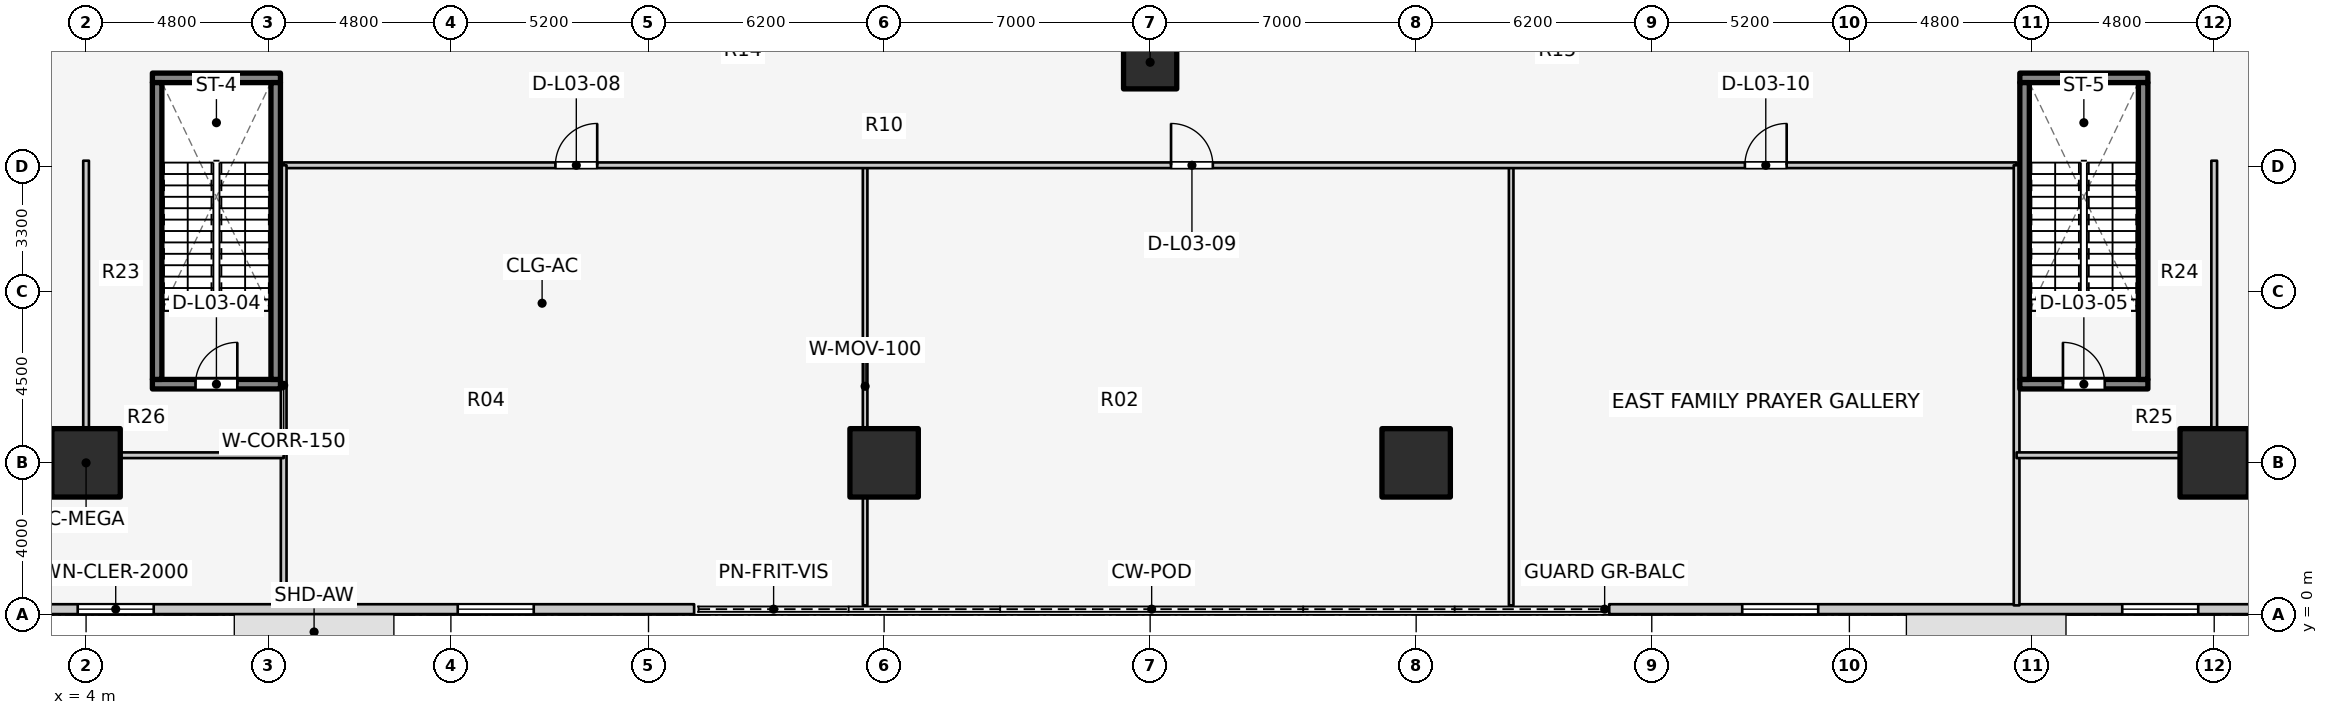
"""IFC4 building model, lengths in metres.
Left out: names, types, materials, properties, quantities, classifications, styles, units other than length and angle.
Written with IfcOpenShell. Run it as: python <this file> out.ifc"""

import sys

from ifc_helpers import new_model, si_unit, direction, frame, frame_2d, origin, origin_2d, place, context, subcontext, project, spatial, rectangle, extrude, element, fill, save


model = new_model("IFC4")
c1 = context("Model", 3, precision=1e-05, world=origin(), true_north=direction((0.0, 1.0)))
c2 = subcontext(c1, "Body", "Model", "MODEL_VIEW")
j1 = project(units=[si_unit("LENGTHUNIT", "METRE"), si_unit("PLANEANGLEUNIT", "RADIAN")], contexts=[c1])
p1 = place(None, origin())
s1 = spatial("IfcSite", under=j1, at=p1, CompositionType="ELEMENT")
p2 = place(p1, origin())
s2 = spatial("IfcBuilding", under=s1, at=p2, CompositionType="ELEMENT")
p3 = place(p2, frame((0.0, 0.0, 9.2)))
s3 = spatial("IfcBuildingStorey", under=s2, at=p3, CompositionType="ELEMENT", Elevation=9.2)
p4 = place(p3, frame((5.745, 6.07, 0.0), z_axis=(0.0, 0.0, 1.0), x_axis=(1.0, 0.0, 0.0)))
e1 = element("IfcWall", 1, at=p4, inside=s3, PredefinedType="SOLIDWALL", context=c2, shape_type="SweptSolid", body=[
    extrude(rectangle(XDim=3.37, YDim=0.25, at=frame_2d((1.685, 0.0))), origin(), (0.0, 0.0, 1.0), 4.6),
])
p5 = place(p4, frame((1.135, 0.0, 0.0)))
e2 = element("IfcOpeningElement", 2, at=p5, cuts=e1, PredefinedType="OPENING", context=c2, shape_type="SweptSolid", body=[
    extrude(rectangle(XDim=1.1, YDim=2.1, at=frame_2d((0.55, 1.05))), frame((0.0, 0.135, 0.0), z_axis=(0.0, -1.0, 0.0), x_axis=(1.0, 0.0, 0.0)), (0.0, 0.0, 1.0), 0.27),
])
p6 = place(p3, frame((5.745, 14.13, 0.0), z_axis=(0.0, 0.0, 1.0), x_axis=(1.0, 0.0, 0.0)))
e3 = element("IfcWall", 3, at=p6, inside=s3, PredefinedType="SOLIDWALL", context=c2, shape_type="SweptSolid", body=[
    extrude(rectangle(XDim=3.37, YDim=0.25, at=frame_2d((1.685, 0.0))), origin(), (0.0, 0.0, 1.0), 4.6),
])
for number, where, z_axis, x_axis in (
    (4, (5.87, 6.195, 0.0), (0.0, 0.0, 1.0), (0.0, 1.0, 0.0)),
    (5, (8.99, 6.195, 0.0), (0.0, 0.0, 1.0), (0.0, 1.0, 0.0)),
):
    element("IfcWall", number, at=place(p3, frame(where, z_axis=z_axis, x_axis=x_axis)), inside=s3, PredefinedType="SOLIDWALL", context=c2, shape_type="SweptSolid", body=[
        extrude(rectangle(XDim=7.81, YDim=0.25, at=frame_2d((3.905, 0.0))), origin(), (0.0, 0.0, 1.0), 4.6),
    ])
p7 = place(p3, frame((54.885, 6.07, 0.0), z_axis=(0.0, 0.0, 1.0), x_axis=(1.0, 0.0, 0.0)))
e6 = element("IfcWall", 6, at=p7, inside=s3, PredefinedType="SOLIDWALL", context=c2, shape_type="SweptSolid", body=[
    extrude(rectangle(XDim=3.37, YDim=0.25, at=frame_2d((1.685, 0.0))), origin(), (0.0, 0.0, 1.0), 4.6),
])
p8 = place(p7, frame((1.135, 0.0, 0.0)))
e7 = element("IfcOpeningElement", 7, at=p8, cuts=e6, PredefinedType="OPENING", context=c2, shape_type="SweptSolid", body=[
    extrude(rectangle(XDim=1.1, YDim=2.1, at=frame_2d((0.55, 1.05))), frame((0.0, 0.135, 0.0), z_axis=(0.0, -1.0, 0.0), x_axis=(1.0, 0.0, 0.0)), (0.0, 0.0, 1.0), 0.27),
])
p9 = place(p3, frame((54.885, 14.13, 0.0), z_axis=(0.0, 0.0, 1.0), x_axis=(1.0, 0.0, 0.0)))
e8 = element("IfcWall", 8, at=p9, inside=s3, PredefinedType="SOLIDWALL", context=c2, shape_type="SweptSolid", body=[
    extrude(rectangle(XDim=3.37, YDim=0.25, at=frame_2d((1.685, 0.0))), origin(), (0.0, 0.0, 1.0), 4.6),
])
for number, where, z_axis, x_axis in (
    (9, (55.01, 6.195, 0.0), (0.0, 0.0, 1.0), (0.0, 1.0, 0.0)),
    (10, (58.13, 6.195, 0.0), (0.0, 0.0, 1.0), (0.0, 1.0, 0.0)),
):
    element("IfcWall", number, at=place(p3, frame(where, z_axis=z_axis, x_axis=x_axis)), inside=s3, PredefinedType="SOLIDWALL", context=c2, shape_type="SweptSolid", body=[
        extrude(rectangle(XDim=7.81, YDim=0.25, at=frame_2d((3.905, 0.0))), origin(), (0.0, 0.0, 1.0), 4.6),
    ])
for number, where, z_axis, x_axis in (
    (11, (4.0, 4.0, 0.0), (0.0, 0.0, 1.0), (1.0, 0.0, 0.0)),
    (12, (25.0, 4.0, 0.0), (0.0, 0.0, 1.0), (1.0, 0.0, 0.0)),
    (13, (39.0, 4.0, 0.0), (0.0, 0.0, 1.0), (1.0, 0.0, 0.0)),
    (14, (60.0, 4.0, 0.0), (0.0, 0.0, 1.0), (1.0, 0.0, 0.0)),
):
    element("IfcColumn", number, at=place(p3, frame(where, z_axis=z_axis, x_axis=x_axis)), inside=s3, PredefinedType="COLUMN", context=c2, shape_type="SweptSolid", body=[
        extrude(rectangle(XDim=1.8, YDim=1.8, at=origin_2d()), origin(), (0.0, 0.0, 1.0), 4.6),
    ])
p10 = place(p3, frame((32.0, 14.54, 0.0), z_axis=(0.0, 0.0, 1.0), x_axis=(1.0, 0.0, 0.0)))
e15 = element("IfcColumn", 15, at=p10, inside=s3, PredefinedType="COLUMN", context=c2, shape_type="SweptSolid", body=[
    extrude(rectangle(XDim=1.4, YDim=1.4, at=origin_2d()), origin(), (0.0, 0.0, 1.0), 4.6),
])
p11 = place(p3, frame((0.28, 0.15, 0.0), z_axis=(0.0, 0.0, 1.0), x_axis=(1.0, 0.0, 0.0)))
e16 = element("IfcWall", 16, at=p11, inside=s3, PredefinedType="STANDARD", context=c2, shape_type="SweptSolid", body=[
    extrude(rectangle(XDim=19.72, YDim=0.26, at=frame_2d((9.86, 0.0))), origin(), (0.0, 0.0, 1.0), 4.28),
])
p12 = place(p11, frame((3.5, 0.0, 2.2)))
e17 = element("IfcOpeningElement", 17, at=p12, cuts=e16, PredefinedType="OPENING", context=c2, shape_type="SweptSolid", body=[
    extrude(rectangle(XDim=2.0, YDim=1.1, at=frame_2d((1.0, 0.55))), frame((0.0, 0.14, 0.0), z_axis=(0.0, -1.0, 0.0), x_axis=(1.0, 0.0, 0.0)), (0.0, 0.0, 1.0), 0.28),
])
p13 = place(p11, frame((13.5, 0.0, 2.2)))
e18 = element("IfcOpeningElement", 18, at=p13, cuts=e16, PredefinedType="OPENING", context=c2, shape_type="SweptSolid", body=[
    extrude(rectangle(XDim=2.0, YDim=1.1, at=frame_2d((1.0, 0.55))), frame((0.0, 0.14, 0.0), z_axis=(0.0, -1.0, 0.0), x_axis=(1.0, 0.0, 0.0)), (0.0, 0.0, 1.0), 0.28),
])
p14 = place(p3, frame((44.08, 0.15, 0.0), z_axis=(0.0, 0.0, 1.0), x_axis=(1.0, 0.0, 0.0)))
e19 = element("IfcWall", 19, at=p14, inside=s3, PredefinedType="STANDARD", context=c2, shape_type="SweptSolid", body=[
    extrude(rectangle(XDim=19.64, YDim=0.26, at=frame_2d((9.82, 0.0))), origin(), (0.0, 0.0, 1.0), 4.28),
])
p15 = place(p14, frame((3.5, 0.0, 2.2)))
e20 = element("IfcOpeningElement", 20, at=p15, cuts=e19, PredefinedType="OPENING", context=c2, shape_type="SweptSolid", body=[
    extrude(rectangle(XDim=2.0, YDim=1.1, at=frame_2d((1.0, 0.55))), frame((0.0, 0.14, 0.0), z_axis=(0.0, -1.0, 0.0), x_axis=(1.0, 0.0, 0.0)), (0.0, 0.0, 1.0), 0.28),
])
p16 = place(p14, frame((13.5, 0.0, 2.2)))
e21 = element("IfcOpeningElement", 21, at=p16, cuts=e19, PredefinedType="OPENING", context=c2, shape_type="SweptSolid", body=[
    extrude(rectangle(XDim=2.0, YDim=1.1, at=frame_2d((1.0, 0.55))), frame((0.0, 0.14, 0.0), z_axis=(0.0, -1.0, 0.0), x_axis=(1.0, 0.0, 0.0)), (0.0, 0.0, 1.0), 0.28),
])
for number, where, z_axis, x_axis in (
    (22, (30.157, 15.157, 0.0), (0.0, 0.0, 1.0), (0.989, -0.149, 0.0)),
    (23, (32.0, 14.88, 0.0), (0.0, 0.0, 1.0), (0.989, 0.149, 0.0)),
):
    element("IfcWall", number, at=place(p3, frame(where, z_axis=z_axis, x_axis=x_axis)), inside=s3, PredefinedType="STANDARD", context=c2, shape_type="SweptSolid", body=[
        extrude(rectangle(XDim=1.864, YDim=0.23, at=frame_2d((0.932, 0.0))), origin(), (0.0, 0.0, 1.0), 3.28),
    ])
for number, where, z_axis, x_axis in (
    (24, (24.5, 0.25, 0.0), (0.0, 0.0, 1.0), (0.0, 1.0, 0.0)),
    (25, (41.5, 0.25, 0.0), (0.0, 0.0, 1.0), (0.0, 1.0, 0.0)),
):
    element("IfcWall", number, at=place(p3, frame(where, z_axis=z_axis, x_axis=x_axis)), inside=s3, PredefinedType="MOVABLE", context=c2, shape_type="SweptSolid", body=[
        extrude(rectangle(XDim=11.53, YDim=0.12, at=frame_2d((5.765, 0.0))), origin(), (0.0, 0.0, 1.0), 3.3),
    ])
p17 = place(p3, frame((9.2, 11.83, 0.0), z_axis=(0.0, 0.0, 1.0), x_axis=(1.0, 0.0, 0.0)))
e26 = element("IfcWall", 26, at=p17, inside=s3, PredefinedType="PARTITIONING", context=c2, shape_type="SweptSolid", body=[
    extrude(rectangle(XDim=45.6, YDim=0.15, at=frame_2d((22.8, 0.0))), origin(), (0.0, 0.0, 1.0), 3.3),
])
p18 = place(p17, frame((7.15, 0.0, 0.0)))
e27 = element("IfcOpeningElement", 27, at=p18, cuts=e26, PredefinedType="OPENING", context=c2, shape_type="SweptSolid", body=[
    extrude(rectangle(XDim=1.1, YDim=2.1, at=frame_2d((0.55, 1.05))), frame((0.0, 0.085, 0.0), z_axis=(0.0, -1.0, 0.0), x_axis=(1.0, 0.0, 0.0)), (0.0, 0.0, 1.0), 0.17),
])
p19 = place(p17, frame((23.35, 0.0, 0.0)))
e28 = element("IfcOpeningElement", 28, at=p19, cuts=e26, PredefinedType="OPENING", context=c2, shape_type="SweptSolid", body=[
    extrude(rectangle(XDim=1.1, YDim=2.1, at=frame_2d((0.55, 1.05))), frame((0.0, 0.085, 0.0), z_axis=(0.0, -1.0, 0.0), x_axis=(1.0, 0.0, 0.0)), (0.0, 0.0, 1.0), 0.17),
])
p20 = place(p17, frame((38.45, 0.0, 0.0)))
e29 = element("IfcOpeningElement", 29, at=p20, cuts=e26, PredefinedType="OPENING", context=c2, shape_type="SweptSolid", body=[
    extrude(rectangle(XDim=1.1, YDim=2.1, at=frame_2d((0.55, 1.05))), frame((0.0, 0.085, 0.0), z_axis=(0.0, -1.0, 0.0), x_axis=(1.0, 0.0, 0.0)), (0.0, 0.0, 1.0), 0.17),
])
for number, where, z_axis, x_axis in (
    (30, (9.2, 0.25, 0.0), (0.0, 0.0, 1.0), (0.0, 1.0, 0.0)),
    (31, (54.8, 0.25, 0.0), (0.0, 0.0, 1.0), (0.0, 1.0, 0.0)),
):
    element("IfcWall", number, at=place(p3, frame(where, z_axis=z_axis, x_axis=x_axis)), inside=s3, PredefinedType="PARTITIONING", context=c2, shape_type="SweptSolid", body=[
        extrude(rectangle(XDim=11.58, YDim=0.15, at=frame_2d((5.79, 0.0))), origin(), (0.0, 0.0, 1.0), 3.3),
    ])
p21 = place(p3, frame((4.0, 4.2, 0.0), z_axis=(0.0, 0.0, 1.0), x_axis=(0.0, 1.0, 0.0)))
e32 = element("IfcWall", 32, at=p21, inside=s3, PredefinedType="PARTITIONING", context=c2, shape_type="SweptSolid", body=[
    extrude(rectangle(XDim=7.75, YDim=0.15, at=frame_2d((3.875, 0.0))), origin(), (0.0, 0.0, 1.0), 3.3),
])
p22 = place(p3, frame((4.0, 4.2, 0.0), z_axis=(0.0, 0.0, 1.0), x_axis=(1.0, 0.0, 0.0)))
e33 = element("IfcWall", 33, at=p22, inside=s3, PredefinedType="PARTITIONING", context=c2, shape_type="SweptSolid", body=[
    extrude(rectangle(XDim=5.2, YDim=0.15, at=frame_2d((2.6, 0.0))), origin(), (0.0, 0.0, 1.0), 3.3),
])
p23 = place(p3, frame((60.0, 4.2, 0.0), z_axis=(0.0, 0.0, 1.0), x_axis=(0.0, 1.0, 0.0)))
e34 = element("IfcWall", 34, at=p23, inside=s3, PredefinedType="PARTITIONING", context=c2, shape_type="SweptSolid", body=[
    extrude(rectangle(XDim=7.75, YDim=0.15, at=frame_2d((3.875, 0.0))), origin(), (0.0, 0.0, 1.0), 3.3),
])
p24 = place(p3, frame((54.8, 4.2, 0.0), z_axis=(0.0, 0.0, 1.0), x_axis=(1.0, 0.0, 0.0)))
e35 = element("IfcWall", 35, at=p24, inside=s3, PredefinedType="PARTITIONING", context=c2, shape_type="SweptSolid", body=[
    extrude(rectangle(XDim=5.2, YDim=0.15, at=frame_2d((2.6, 0.0))), origin(), (0.0, 0.0, 1.0), 3.3),
])
p25 = place(p12, origin())
e36 = element("IfcWindow", 36, at=p25, inside=s3, PartitioningType="SINGLE_PANEL", PredefinedType="WINDOW", context=c2, shape_type="SweptSolid", body=[
    extrude(rectangle(XDim=2.0, YDim=1.1, at=frame_2d((1.0, 0.55))), frame((0.0, 0.03, 0.0), z_axis=(0.0, -1.0, 0.0), x_axis=(1.0, 0.0, 0.0)), (0.0, 0.0, 1.0), 0.06),
])
fill(e17, e36)
p26 = place(p13, origin())
e37 = element("IfcWindow", 37, at=p26, inside=s3, PartitioningType="SINGLE_PANEL", PredefinedType="WINDOW", context=c2, shape_type="SweptSolid", body=[
    extrude(rectangle(XDim=2.0, YDim=1.1, at=frame_2d((1.0, 0.55))), frame((0.0, 0.03, 0.0), z_axis=(0.0, -1.0, 0.0), x_axis=(1.0, 0.0, 0.0)), (0.0, 0.0, 1.0), 0.06),
])
fill(e18, e37)
p27 = place(p15, origin())
e38 = element("IfcWindow", 38, at=p27, inside=s3, PartitioningType="SINGLE_PANEL", PredefinedType="WINDOW", context=c2, shape_type="SweptSolid", body=[
    extrude(rectangle(XDim=2.0, YDim=1.1, at=frame_2d((1.0, 0.55))), frame((0.0, 0.03, 0.0), z_axis=(0.0, -1.0, 0.0), x_axis=(1.0, 0.0, 0.0)), (0.0, 0.0, 1.0), 0.06),
])
fill(e20, e38)
p28 = place(p16, origin())
e39 = element("IfcWindow", 39, at=p28, inside=s3, PartitioningType="SINGLE_PANEL", PredefinedType="WINDOW", context=c2, shape_type="SweptSolid", body=[
    extrude(rectangle(XDim=2.0, YDim=1.1, at=frame_2d((1.0, 0.55))), frame((0.0, 0.03, 0.0), z_axis=(0.0, -1.0, 0.0), x_axis=(1.0, 0.0, 0.0)), (0.0, 0.0, 1.0), 0.06),
])
fill(e21, e39)
p29 = place(p5, origin())
e40 = element("IfcDoor", 40, at=p29, inside=s3, OperationType="SINGLE_SWING_RIGHT", PredefinedType="DOOR", context=c2, shape_type="SweptSolid", body=[
    extrude(rectangle(XDim=1.1, YDim=2.1, at=frame_2d((0.55, 1.05))), frame((0.0, 0.025, 0.0), z_axis=(0.0, -1.0, 0.0), x_axis=(1.0, 0.0, 0.0)), (0.0, 0.0, 1.0), 0.05),
])
fill(e2, e40)
p30 = place(p8, origin())
e41 = element("IfcDoor", 41, at=p30, inside=s3, OperationType="SINGLE_SWING_LEFT", PredefinedType="DOOR", context=c2, shape_type="SweptSolid", body=[
    extrude(rectangle(XDim=1.1, YDim=2.1, at=frame_2d((0.55, 1.05))), frame((0.0, 0.025, 0.0), z_axis=(0.0, -1.0, 0.0), x_axis=(1.0, 0.0, 0.0)), (0.0, 0.0, 1.0), 0.05),
])
fill(e7, e41)
p31 = place(p18, origin())
e42 = element("IfcDoor", 42, at=p31, inside=s3, OperationType="SINGLE_SWING_RIGHT", PredefinedType="DOOR", context=c2, shape_type="SweptSolid", body=[
    extrude(rectangle(XDim=1.1, YDim=2.1, at=frame_2d((0.55, 1.05))), frame((0.0, 0.025, 0.0), z_axis=(0.0, -1.0, 0.0), x_axis=(1.0, 0.0, 0.0)), (0.0, 0.0, 1.0), 0.05),
])
fill(e27, e42)
p32 = place(p19, origin())
e43 = element("IfcDoor", 43, at=p32, inside=s3, OperationType="SINGLE_SWING_LEFT", PredefinedType="DOOR", context=c2, shape_type="SweptSolid", body=[
    extrude(rectangle(XDim=1.1, YDim=2.1, at=frame_2d((0.55, 1.05))), frame((0.0, 0.025, 0.0), z_axis=(0.0, -1.0, 0.0), x_axis=(1.0, 0.0, 0.0)), (0.0, 0.0, 1.0), 0.05),
])
fill(e28, e43)
p33 = place(p20, origin())
e44 = element("IfcDoor", 44, at=p33, inside=s3, OperationType="SINGLE_SWING_RIGHT", PredefinedType="DOOR", context=c2, shape_type="SweptSolid", body=[
    extrude(rectangle(XDim=1.1, YDim=2.1, at=frame_2d((0.55, 1.05))), frame((0.0, 0.025, 0.0), z_axis=(0.0, -1.0, 0.0), x_axis=(1.0, 0.0, 0.0)), (0.0, 0.0, 1.0), 0.05),
])
fill(e29, e44)
save(model, sys.argv[1])
